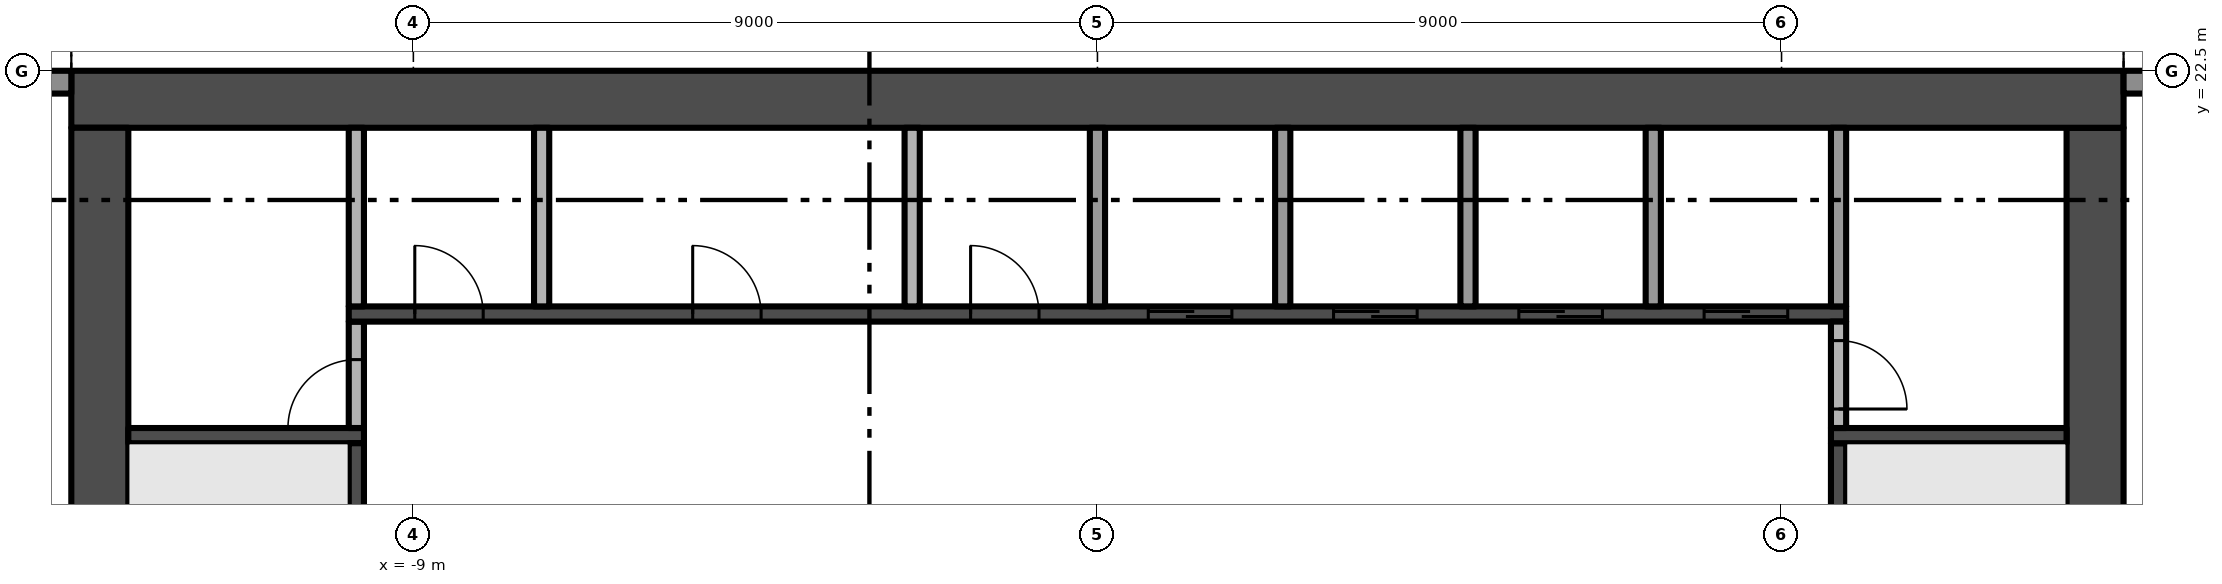
"""IFC4 building model, lengths in metres.
Left out: names, types, materials, properties, quantities, classifications, styles, units other than length and angle.
Written with IfcOpenShell. Run it as: python <this file> out.ifc"""

import sys

from ifc_helpers import new_model, si_unit, direction, frame, frame_2d, origin, place, context, subcontext, project, spatial, rectangle, extrude, element, fill, save


model = new_model("IFC4")
c1 = context("Model", 3, precision=1e-05, world=origin(), true_north=direction((0.0, 1.0)))
c2 = subcontext(c1, "Body", "Model", "MODEL_VIEW")
j1 = project(units=[si_unit("LENGTHUNIT", "METRE"), si_unit("PLANEANGLEUNIT", "RADIAN")], contexts=[c1])
p1 = place(None, origin())
s1 = spatial("IfcSite", under=j1, at=p1, CompositionType="ELEMENT")
p2 = place(p1, origin())
s2 = spatial("IfcBuilding", under=s1, at=p2, CompositionType="ELEMENT")
p3 = place(p2, frame((0.0, 0.0, 159.2)))
s3 = spatial("IfcBuildingStorey", under=s2, at=p3, CompositionType="ELEMENT", Elevation=159.2)
p4 = place(p3, frame((13.125, 5.25, -0.3), z_axis=(0.0, 0.0, 1.0), x_axis=(0.0, 1.0, 0.0)))
e1 = element("IfcWall", 1, at=p4, inside=s3, PredefinedType="SHEAR", context=c2, shape_type="SweptSolid", body=[
    extrude(rectangle(XDim=16.5, YDim=0.75, at=frame_2d((8.25, 0.0))), origin(), (0.0, 0.0, 1.0), 3.8),
])
p5 = place(p4, frame((6.15, 0.0, 0.3)))
e2 = element("IfcOpeningElement", 2, at=p5, cuts=e1, PredefinedType="OPENING", context=c2, shape_type="SweptSolid", body=[
    extrude(rectangle(XDim=1.2, YDim=2.2, at=frame_2d((0.6, 1.1))), frame((0.0, 0.385, 0.0), z_axis=(0.0, -1.0, 0.0), x_axis=(1.0, 0.0, 0.0)), (0.0, 0.0, 1.0), 0.77),
])
p6 = place(p3, frame((13.5, 22.125, -0.3), z_axis=(0.0, 0.0, 1.0), x_axis=(-1.0, 0.0, 0.0)))
e3 = element("IfcWall", 3, at=p6, inside=s3, PredefinedType="SHEAR", context=c2, shape_type="SweptSolid", body=[
    extrude(rectangle(XDim=27.0, YDim=0.75, at=frame_2d((13.5, 0.0))), origin(), (0.0, 0.0, 1.0), 3.8),
])
p7 = place(p3, frame((-13.125, 21.75, -0.3), z_axis=(0.0, 0.0, 1.0), x_axis=(0.0, -1.0, 0.0)))
e4 = element("IfcWall", 4, at=p7, inside=s3, PredefinedType="SHEAR", context=c2, shape_type="SweptSolid", body=[
    extrude(rectangle(XDim=16.5, YDim=0.75, at=frame_2d((8.25, 0.0))), origin(), (0.0, 0.0, 1.0), 3.8),
])
p8 = place(p7, frame((9.15, 0.0, 0.3)))
e5 = element("IfcOpeningElement", 5, at=p8, cuts=e4, PredefinedType="OPENING", context=c2, shape_type="SweptSolid", body=[
    extrude(rectangle(XDim=1.2, YDim=2.2, at=frame_2d((0.6, 1.1))), frame((0.0, 0.385, 0.0), z_axis=(0.0, -1.0, 0.0), x_axis=(1.0, 0.0, 0.0)), (0.0, 0.0, 1.0), 0.77),
])
p9 = place(p3, frame((13.5, 22.35, 0.0), z_axis=(0.0, 0.0, 1.0), x_axis=(1.0, 0.0, 0.0)))
e6 = element("IfcWall", 6, at=p9, inside=s3, PredefinedType="SOLIDWALL", context=c2, shape_type="SweptSolid", body=[
    extrude(rectangle(XDim=3.4, YDim=0.3, at=frame_2d((1.7, 0.0))), origin(), (0.0, 0.0, 1.0), 3.5),
])
p10 = place(p9, frame((1.9, 0.0, 0.0)))
e7 = element("IfcOpeningElement", 7, at=p10, cuts=e6, PredefinedType="OPENING", context=c2, shape_type="SweptSolid", body=[
    extrude(rectangle(XDim=1.2, YDim=2.4, at=frame_2d((0.6, 1.2))), frame((0.0, 0.16, 0.0), z_axis=(0.0, -1.0, 0.0), x_axis=(1.0, 0.0, 0.0)), (0.0, 0.0, 1.0), 0.32),
])
p11 = place(p9, frame((0.7, 0.0, 0.45)))
e8 = element("IfcOpeningElement", 8, at=p11, cuts=e6, PredefinedType="OPENING", context=c2, shape_type="SweptSolid", body=[
    extrude(rectangle(XDim=1.05, YDim=2.65, at=frame_2d((0.525, 1.325))), frame((0.0, 0.16, 0.0), z_axis=(0.0, -1.0, 0.0), x_axis=(1.0, 0.0, 0.0)), (0.0, 0.0, 1.0), 0.32),
])
p12 = place(p3, frame((-16.9, 22.35, 0.0), z_axis=(0.0, 0.0, 1.0), x_axis=(1.0, 0.0, 0.0)))
e9 = element("IfcWall", 9, at=p12, inside=s3, PredefinedType="SOLIDWALL", context=c2, shape_type="SweptSolid", body=[
    extrude(rectangle(XDim=3.4, YDim=0.3, at=frame_2d((1.7, 0.0))), origin(), (0.0, 0.0, 1.0), 3.5),
])
p13 = place(p12, frame((1.5, 0.0, 0.0)))
e10 = element("IfcOpeningElement", 10, at=p13, cuts=e9, PredefinedType="OPENING", context=c2, shape_type="SweptSolid", body=[
    extrude(rectangle(XDim=1.2, YDim=2.4, at=frame_2d((0.6, 1.2))), frame((0.0, 0.16, 0.0), z_axis=(0.0, -1.0, 0.0), x_axis=(1.0, 0.0, 0.0)), (0.0, 0.0, 1.0), 0.32),
])
p14 = place(p12, frame((0.3, 0.0, 0.45)))
e11 = element("IfcOpeningElement", 11, at=p14, cuts=e9, PredefinedType="OPENING", context=c2, shape_type="SweptSolid", body=[
    extrude(rectangle(XDim=1.05, YDim=2.65, at=frame_2d((0.525, 1.325))), frame((0.0, 0.16, 0.0), z_axis=(0.0, -1.0, 0.0), x_axis=(1.0, 0.0, 0.0)), (0.0, 0.0, 1.0), 0.32),
])
p15 = place(p3, frame((-12.75, 17.7, 0.0), z_axis=(0.0, 0.0, 1.0), x_axis=(1.0, 0.0, 0.0)))
e12 = element("IfcWall", 12, at=p15, inside=s3, PredefinedType="SHEAR", context=c2, shape_type="SweptSolid", body=[
    extrude(rectangle(XDim=3.1, YDim=0.2, at=frame_2d((1.55, 0.0))), origin(), (0.0, 0.0, 1.0), 3.5),
])
p16 = place(p3, frame((-9.75, 16.1, 0.0), z_axis=(0.0, 0.0, 1.0), x_axis=(0.0, 1.0, 0.0)))
e13 = element("IfcWall", 13, at=p16, inside=s3, PredefinedType="SHEAR", context=c2, shape_type="SweptSolid", body=[
    extrude(rectangle(XDim=1.5, YDim=0.2, at=frame_2d((0.75, 0.0))), origin(), (0.0, 0.0, 1.0), 3.5),
])
p17 = place(p3, frame((-9.75, 17.8, 0.0), z_axis=(0.0, 0.0, 1.0), x_axis=(0.0, 1.0, 0.0)))
e14 = element("IfcWall", 14, at=p17, inside=s3, PredefinedType="PARTITIONING", context=c2, shape_type="SweptSolid", body=[
    extrude(rectangle(XDim=1.4, YDim=0.2, at=frame_2d((0.7, 0.0))), origin(), (0.0, 0.0, 1.0), 3.5),
])
p18 = place(p17, origin())
e15 = element("IfcOpeningElement", 15, at=p18, cuts=e14, PredefinedType="OPENING", context=c2, shape_type="SweptSolid", body=[
    extrude(rectangle(XDim=0.9, YDim=2.1, at=frame_2d((0.45, 1.05))), frame((0.0, 0.11, 0.0), z_axis=(0.0, -1.0, 0.0), x_axis=(1.0, 0.0, 0.0)), (0.0, 0.0, 1.0), 0.22),
])
p19 = place(p3, frame((-9.85, 19.3, 0.0), z_axis=(0.0, 0.0, 1.0), x_axis=(1.0, 0.0, 0.0)))
e16 = element("IfcWall", 16, at=p19, inside=s3, PredefinedType="SHEAR", context=c2, shape_type="SweptSolid", body=[
    extrude(rectangle(XDim=19.7, YDim=0.2, at=frame_2d((9.85, 0.0))), origin(), (0.0, 0.0, 1.0), 3.5),
])
p20 = place(p19, frame((10.519, 0.0, 0.0)))
e17 = element("IfcOpeningElement", 17, at=p20, cuts=e16, PredefinedType="OPENING", context=c2, shape_type="SweptSolid", body=[
    extrude(rectangle(XDim=1.1, YDim=2.1, at=frame_2d((0.55, 1.05))), frame((0.0, 0.11, 0.0), z_axis=(0.0, -1.0, 0.0), x_axis=(1.0, 0.0, 0.0)), (0.0, 0.0, 1.0), 0.22),
])
p21 = place(p19, frame((12.956, 0.0, 0.0)))
e18 = element("IfcOpeningElement", 18, at=p21, cuts=e16, PredefinedType="OPENING", context=c2, shape_type="SweptSolid", body=[
    extrude(rectangle(XDim=1.1, YDim=2.1, at=frame_2d((0.55, 1.05))), frame((0.0, 0.11, 0.0), z_axis=(0.0, -1.0, 0.0), x_axis=(1.0, 0.0, 0.0)), (0.0, 0.0, 1.0), 0.22),
])
p22 = place(p19, frame((15.394, 0.0, 0.0)))
e19 = element("IfcOpeningElement", 19, at=p22, cuts=e16, PredefinedType="OPENING", context=c2, shape_type="SweptSolid", body=[
    extrude(rectangle(XDim=1.1, YDim=2.1, at=frame_2d((0.55, 1.05))), frame((0.0, 0.11, 0.0), z_axis=(0.0, -1.0, 0.0), x_axis=(1.0, 0.0, 0.0)), (0.0, 0.0, 1.0), 0.22),
])
p23 = place(p19, frame((17.831, 0.0, 0.0)))
e20 = element("IfcOpeningElement", 20, at=p23, cuts=e16, PredefinedType="OPENING", context=c2, shape_type="SweptSolid", body=[
    extrude(rectangle(XDim=1.1, YDim=2.1, at=frame_2d((0.55, 1.05))), frame((0.0, 0.11, 0.0), z_axis=(0.0, -1.0, 0.0), x_axis=(1.0, 0.0, 0.0)), (0.0, 0.0, 1.0), 0.22),
])
p24 = place(p19, frame((0.869, 0.0, 0.0)))
e21 = element("IfcOpeningElement", 21, at=p24, cuts=e16, PredefinedType="OPENING", context=c2, shape_type="SweptSolid", body=[
    extrude(rectangle(XDim=0.9, YDim=2.1, at=frame_2d((0.45, 1.05))), frame((0.0, 0.11, 0.0), z_axis=(0.0, -1.0, 0.0), x_axis=(1.0, 0.0, 0.0)), (0.0, 0.0, 1.0), 0.22),
])
p25 = place(p19, frame((4.525, 0.0, 0.0)))
e22 = element("IfcOpeningElement", 22, at=p25, cuts=e16, PredefinedType="OPENING", context=c2, shape_type="SweptSolid", body=[
    extrude(rectangle(XDim=0.9, YDim=2.1, at=frame_2d((0.45, 1.05))), frame((0.0, 0.11, 0.0), z_axis=(0.0, -1.0, 0.0), x_axis=(1.0, 0.0, 0.0)), (0.0, 0.0, 1.0), 0.22),
])
p26 = place(p19, frame((8.181, 0.0, 0.0)))
e23 = element("IfcOpeningElement", 23, at=p26, cuts=e16, PredefinedType="OPENING", context=c2, shape_type="SweptSolid", body=[
    extrude(rectangle(XDim=0.9, YDim=2.1, at=frame_2d((0.45, 1.05))), frame((0.0, 0.11, 0.0), z_axis=(0.0, -1.0, 0.0), x_axis=(1.0, 0.0, 0.0)), (0.0, 0.0, 1.0), 0.22),
])
for number, where, z_axis, x_axis in (
    (24, (-9.75, 19.4, 0.0), (0.0, 0.0, 1.0), (0.0, 1.0, 0.0)),
    (25, (-7.312, 19.4, 0.0), (0.0, 0.0, 1.0), (0.0, 1.0, 0.0)),
    (26, (-2.438, 19.4, 0.0), (0.0, 0.0, 1.0), (0.0, 1.0, 0.0)),
    (27, (0.0, 19.4, 0.0), (0.0, 0.0, 1.0), (0.0, 1.0, 0.0)),
    (28, (2.438, 19.4, 0.0), (0.0, 0.0, 1.0), (0.0, 1.0, 0.0)),
    (29, (4.875, 19.4, 0.0), (0.0, 0.0, 1.0), (0.0, 1.0, 0.0)),
    (30, (7.312, 19.4, 0.0), (0.0, 0.0, 1.0), (0.0, 1.0, 0.0)),
):
    element("IfcWall", number, at=place(p3, frame(where, z_axis=z_axis, x_axis=x_axis)), inside=s3, PredefinedType="PARTITIONING", context=c2, shape_type="SweptSolid", body=[
        extrude(rectangle(XDim=2.35, YDim=0.2, at=frame_2d((1.175, 0.0))), origin(), (0.0, 0.0, 1.0), 3.5),
    ])
p27 = place(p3, frame((9.75, 16.1, 0.0), z_axis=(0.0, 0.0, 1.0), x_axis=(0.0, 1.0, 0.0)))
e31 = element("IfcWall", 31, at=p27, inside=s3, PredefinedType="SHEAR", context=c2, shape_type="SweptSolid", body=[
    extrude(rectangle(XDim=1.5, YDim=0.2, at=frame_2d((0.75, 0.0))), origin(), (0.0, 0.0, 1.0), 3.5),
])
p28 = place(p3, frame((9.65, 17.7, 0.0), z_axis=(0.0, 0.0, 1.0), x_axis=(1.0, 0.0, 0.0)))
e32 = element("IfcWall", 32, at=p28, inside=s3, PredefinedType="SHEAR", context=c2, shape_type="SweptSolid", body=[
    extrude(rectangle(XDim=3.1, YDim=0.2, at=frame_2d((1.55, 0.0))), origin(), (0.0, 0.0, 1.0), 3.5),
])
p29 = place(p3, frame((9.75, 19.2, 0.0), z_axis=(0.0, 0.0, 1.0), x_axis=(0.0, -1.0, 0.0)))
e33 = element("IfcWall", 33, at=p29, inside=s3, PredefinedType="PARTITIONING", context=c2, shape_type="SweptSolid", body=[
    extrude(rectangle(XDim=1.4, YDim=0.2, at=frame_2d((0.7, 0.0))), origin(), (0.0, 0.0, 1.0), 3.5),
])
p30 = place(p29, frame((0.25, 0.0, 0.0)))
e34 = element("IfcOpeningElement", 34, at=p30, cuts=e33, PredefinedType="OPENING", context=c2, shape_type="SweptSolid", body=[
    extrude(rectangle(XDim=0.9, YDim=2.1, at=frame_2d((0.45, 1.05))), frame((0.0, 0.11, 0.0), z_axis=(0.0, -1.0, 0.0), x_axis=(1.0, 0.0, 0.0)), (0.0, 0.0, 1.0), 0.22),
])
p31 = place(p3, frame((9.75, 19.4, 0.0), z_axis=(0.0, 0.0, 1.0), x_axis=(0.0, 1.0, 0.0)))
e35 = element("IfcWall", 35, at=p31, inside=s3, PredefinedType="PARTITIONING", context=c2, shape_type="SweptSolid", body=[
    extrude(rectangle(XDim=2.35, YDim=0.2, at=frame_2d((1.175, 0.0))), origin(), (0.0, 0.0, 1.0), 3.5),
])
p32 = place(p20, origin())
e36 = element("IfcDoor", 36, at=p32, inside=s3, OperationType="SLIDING_TO_RIGHT", PredefinedType="DOOR", context=c2, shape_type="SweptSolid", body=[
    extrude(rectangle(XDim=1.1, YDim=2.1, at=frame_2d((0.55, 1.05))), frame((0.0, 0.025, 0.0), z_axis=(0.0, -1.0, 0.0), x_axis=(1.0, 0.0, 0.0)), (0.0, 0.0, 1.0), 0.05),
])
fill(e17, e36)
p33 = place(p21, origin())
e37 = element("IfcDoor", 37, at=p33, inside=s3, OperationType="SLIDING_TO_RIGHT", PredefinedType="DOOR", context=c2, shape_type="SweptSolid", body=[
    extrude(rectangle(XDim=1.1, YDim=2.1, at=frame_2d((0.55, 1.05))), frame((0.0, 0.025, 0.0), z_axis=(0.0, -1.0, 0.0), x_axis=(1.0, 0.0, 0.0)), (0.0, 0.0, 1.0), 0.05),
])
fill(e18, e37)
p34 = place(p22, origin())
e38 = element("IfcDoor", 38, at=p34, inside=s3, OperationType="SLIDING_TO_RIGHT", PredefinedType="DOOR", context=c2, shape_type="SweptSolid", body=[
    extrude(rectangle(XDim=1.1, YDim=2.1, at=frame_2d((0.55, 1.05))), frame((0.0, 0.025, 0.0), z_axis=(0.0, -1.0, 0.0), x_axis=(1.0, 0.0, 0.0)), (0.0, 0.0, 1.0), 0.05),
])
fill(e19, e38)
p35 = place(p23, origin())
e39 = element("IfcDoor", 39, at=p35, inside=s3, OperationType="SLIDING_TO_RIGHT", PredefinedType="DOOR", context=c2, shape_type="SweptSolid", body=[
    extrude(rectangle(XDim=1.1, YDim=2.1, at=frame_2d((0.55, 1.05))), frame((0.0, 0.025, 0.0), z_axis=(0.0, -1.0, 0.0), x_axis=(1.0, 0.0, 0.0)), (0.0, 0.0, 1.0), 0.05),
])
fill(e20, e39)
p36 = place(p18, origin())
e40 = element("IfcDoor", 40, at=p36, inside=s3, OperationType="SINGLE_SWING_LEFT", PredefinedType="DOOR", context=c2, shape_type="SweptSolid", body=[
    extrude(rectangle(XDim=0.9, YDim=2.1, at=frame_2d((0.45, 1.05))), frame((0.0, 0.025, 0.0), z_axis=(0.0, -1.0, 0.0), x_axis=(1.0, 0.0, 0.0)), (0.0, 0.0, 1.0), 0.05),
])
fill(e15, e40)
p37 = place(p30, origin())
e41 = element("IfcDoor", 41, at=p37, inside=s3, OperationType="SINGLE_SWING_RIGHT", PredefinedType="DOOR", context=c2, shape_type="SweptSolid", body=[
    extrude(rectangle(XDim=0.9, YDim=2.1, at=frame_2d((0.45, 1.05))), frame((0.0, 0.025, 0.0), z_axis=(0.0, -1.0, 0.0), x_axis=(1.0, 0.0, 0.0)), (0.0, 0.0, 1.0), 0.05),
])
fill(e34, e41)
p38 = place(p24, origin())
e42 = element("IfcDoor", 42, at=p38, inside=s3, OperationType="SINGLE_SWING_LEFT", PredefinedType="DOOR", context=c2, shape_type="SweptSolid", body=[
    extrude(rectangle(XDim=0.9, YDim=2.1, at=frame_2d((0.45, 1.05))), frame((0.0, 0.025, 0.0), z_axis=(0.0, -1.0, 0.0), x_axis=(1.0, 0.0, 0.0)), (0.0, 0.0, 1.0), 0.05),
])
fill(e21, e42)
p39 = place(p25, origin())
e43 = element("IfcDoor", 43, at=p39, inside=s3, OperationType="SINGLE_SWING_LEFT", PredefinedType="DOOR", context=c2, shape_type="SweptSolid", body=[
    extrude(rectangle(XDim=0.9, YDim=2.1, at=frame_2d((0.45, 1.05))), frame((0.0, 0.025, 0.0), z_axis=(0.0, -1.0, 0.0), x_axis=(1.0, 0.0, 0.0)), (0.0, 0.0, 1.0), 0.05),
])
fill(e22, e43)
p40 = place(p26, origin())
e44 = element("IfcDoor", 44, at=p40, inside=s3, OperationType="SINGLE_SWING_LEFT", PredefinedType="DOOR", context=c2, shape_type="SweptSolid", body=[
    extrude(rectangle(XDim=0.9, YDim=2.1, at=frame_2d((0.45, 1.05))), frame((0.0, 0.025, 0.0), z_axis=(0.0, -1.0, 0.0), x_axis=(1.0, 0.0, 0.0)), (0.0, 0.0, 1.0), 0.05),
])
fill(e23, e44)
save(model, sys.argv[1])
